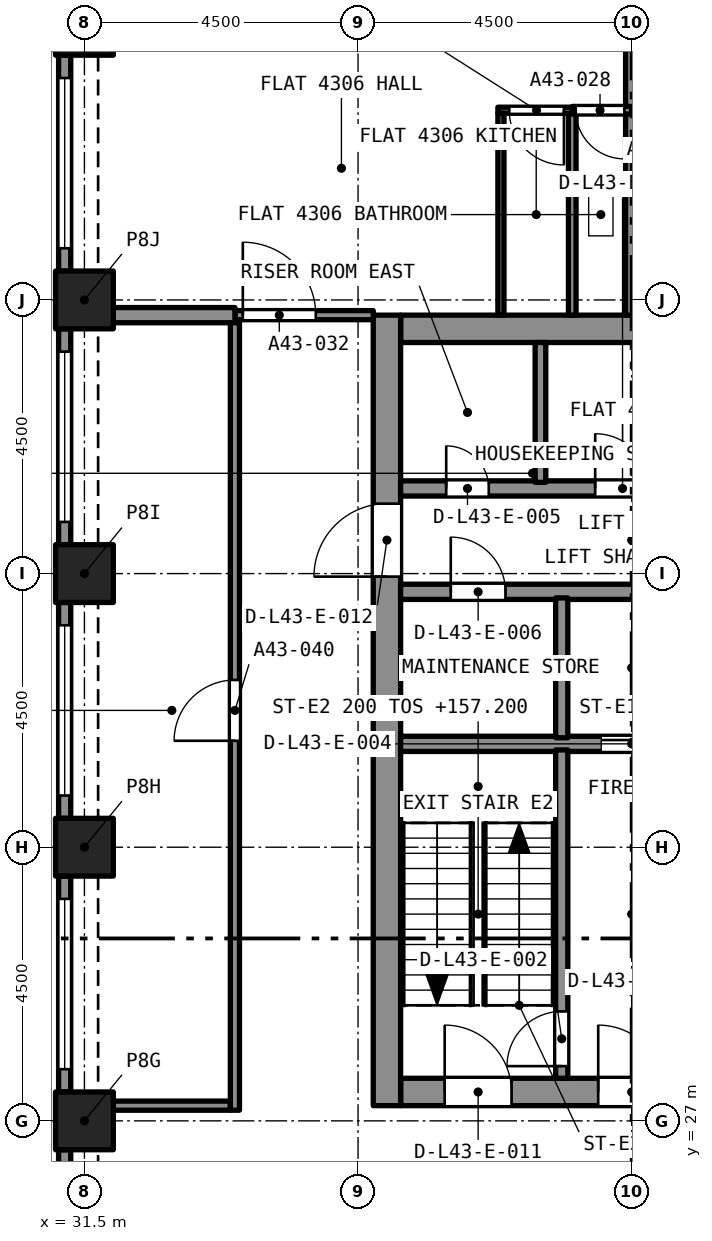
"""IFC4 building model, lengths in metres.
Left out: names, types, materials, properties, quantities, classifications, styles, units other than length and angle.
Written with IfcOpenShell. Run it as: python <this file> out.ifc"""

import sys

from ifc_helpers import new_model, si_unit, direction, frame, frame_2d, origin, origin_2d, place, context, subcontext, project, spatial, rectangle, extrude, element, fill, save


model = new_model("IFC4")
c1 = context("Model", 3, precision=1e-05, world=origin(), true_north=direction((0.0, 1.0)))
c2 = subcontext(c1, "Body", "Model", "MODEL_VIEW")
j1 = project(units=[si_unit("LENGTHUNIT", "METRE"), si_unit("PLANEANGLEUNIT", "RADIAN")], contexts=[c1])
p1 = place(None, origin())
s1 = spatial("IfcSite", under=j1, at=p1, CompositionType="ELEMENT")
p2 = place(p1, origin())
s2 = spatial("IfcBuilding", under=s1, at=p2, CompositionType="ELEMENT")
p3 = place(p2, frame((0.0, 0.0, 155.0)))
s3 = spatial("IfcBuildingStorey", under=s2, at=p3, CompositionType="ELEMENT", Elevation=155.0)
for number, where, z_axis, x_axis in (
    (1, (31.5, 27.0, 0.0), (0.0, 0.0, 1.0), (1.0, 0.0, 0.0)),
    (2, (31.5, 31.5, 0.0), (0.0, 0.0, 1.0), (1.0, 0.0, 0.0)),
    (3, (31.5, 36.0, 0.0), (0.0, 0.0, 1.0), (1.0, 0.0, 0.0)),
    (4, (31.5, 40.5, 0.0), (0.0, 0.0, 1.0), (1.0, 0.0, 0.0)),
    (5, (31.5, 45.0, 0.0), (0.0, 0.0, 1.0), (1.0, 0.0, 0.0)),
):
    element("IfcColumn", number, at=place(p3, frame(where, z_axis=z_axis, x_axis=x_axis)), inside=s3, PredefinedType="COLUMN", context=c2, shape_type="SweptSolid", body=[
        extrude(rectangle(XDim=0.95, YDim=0.95, at=origin_2d()), origin(), (0.0, 0.0, 1.0), 4.4),
    ])
p4 = place(p3, frame((36.7, 27.475, 0.0), z_axis=(0.0, 0.0, 1.0), x_axis=(1.0, 0.0, 0.0)))
e6 = element("IfcWall", 6, at=p4, inside=s3, PredefinedType="SOLIDWALL", context=c2, shape_type="SweptSolid", body=[
    extrude(rectangle(XDim=7.6, YDim=0.45, at=frame_2d((3.8, 0.0))), origin(), (0.0, 0.0, 1.0), 4.4),
])
p5 = place(p4, frame((5.775, 0.0, 0.0)))
e7 = element("IfcOpeningElement", 7, at=p5, cuts=e6, PredefinedType="OPENING", context=c2, shape_type="SweptSolid", body=[
    extrude(rectangle(XDim=1.1, YDim=2.1, at=frame_2d((0.55, 1.05))), frame((0.0, 0.235, 0.0), z_axis=(0.0, -1.0, 0.0), x_axis=(1.0, 0.0, 0.0)), (0.0, 0.0, 1.0), 0.47),
])
p6 = place(p4, frame((3.25, 0.0, 0.0)))
e8 = element("IfcOpeningElement", 8, at=p6, cuts=e6, PredefinedType="OPENING", context=c2, shape_type="SweptSolid", body=[
    extrude(rectangle(XDim=1.1, YDim=2.1, at=frame_2d((0.55, 1.05))), frame((0.0, 0.235, 0.0), z_axis=(0.0, -1.0, 0.0), x_axis=(1.0, 0.0, 0.0)), (0.0, 0.0, 1.0), 0.47),
])
p7 = place(p4, frame((0.725, 0.0, 0.0)))
e9 = element("IfcOpeningElement", 9, at=p7, cuts=e6, PredefinedType="OPENING", context=c2, shape_type="SweptSolid", body=[
    extrude(rectangle(XDim=1.1, YDim=2.1, at=frame_2d((0.55, 1.05))), frame((0.0, 0.235, 0.0), z_axis=(0.0, -1.0, 0.0), x_axis=(1.0, 0.0, 0.0)), (0.0, 0.0, 1.0), 0.47),
])
p8 = place(p3, frame((36.7, 40.025, 0.0), z_axis=(0.0, 0.0, 1.0), x_axis=(1.0, 0.0, 0.0)))
e10 = element("IfcWall", 10, at=p8, inside=s3, PredefinedType="SOLIDWALL", context=c2, shape_type="SweptSolid", body=[
    extrude(rectangle(XDim=7.6, YDim=0.45, at=frame_2d((3.8, 0.0))), origin(), (0.0, 0.0, 1.0), 4.4),
])
p9 = place(p3, frame((36.475, 27.25, 0.0), z_axis=(0.0, 0.0, 1.0), x_axis=(0.0, 1.0, 0.0)))
e11 = element("IfcWall", 11, at=p9, inside=s3, PredefinedType="SOLIDWALL", context=c2, shape_type="SweptSolid", body=[
    extrude(rectangle(XDim=13.0, YDim=0.45, at=frame_2d((6.5, 0.0))), origin(), (0.0, 0.0, 1.0), 4.4),
])
p10 = place(p9, frame((8.7, 0.0, 0.0)))
e12 = element("IfcOpeningElement", 12, at=p10, cuts=e11, PredefinedType="OPENING", context=c2, shape_type="SweptSolid", body=[
    extrude(rectangle(XDim=1.2, YDim=2.1, at=frame_2d((0.6, 1.05))), frame((0.0, 0.235, 0.0), z_axis=(0.0, -1.0, 0.0), x_axis=(1.0, 0.0, 0.0)), (0.0, 0.0, 1.0), 0.47),
])
p11 = place(p3, frame((31.175, 40.975, 0.0), z_axis=(0.0, 0.0, 1.0), x_axis=(0.0, 1.0, 0.0)))
e13 = element("IfcWall", 13, at=p11, inside=s3, PredefinedType="SOLIDWALL", context=c2, shape_type="SweptSolid", body=[
    extrude(rectangle(XDim=3.55, YDim=0.2, at=frame_2d((1.775, 0.0))), origin(), (0.0, 0.0, 1.0), 4.4),
])
p12 = place(p11, frame((0.375, 0.0, 0.45)))
e14 = element("IfcOpeningElement", 14, at=p12, cuts=e13, PredefinedType="OPENING", context=c2, shape_type="SweptSolid", body=[
    extrude(rectangle(XDim=2.8, YDim=2.55, at=frame_2d((1.4, 1.275))), frame((0.0, 0.11, 0.0), z_axis=(0.0, -1.0, 0.0), x_axis=(1.0, 0.0, 0.0)), (0.0, 0.0, 1.0), 0.22),
])
p13 = place(p3, frame((31.175, 36.475, 0.0), z_axis=(0.0, 0.0, 1.0), x_axis=(0.0, 1.0, 0.0)))
e15 = element("IfcWall", 15, at=p13, inside=s3, PredefinedType="SOLIDWALL", context=c2, shape_type="SweptSolid", body=[
    extrude(rectangle(XDim=3.55, YDim=0.2, at=frame_2d((1.775, 0.0))), origin(), (0.0, 0.0, 1.0), 4.4),
])
p14 = place(p13, frame((0.375, 0.0, 0.45)))
e16 = element("IfcOpeningElement", 16, at=p14, cuts=e15, PredefinedType="OPENING", context=c2, shape_type="SweptSolid", body=[
    extrude(rectangle(XDim=2.8, YDim=2.55, at=frame_2d((1.4, 1.275))), frame((0.0, 0.11, 0.0), z_axis=(0.0, -1.0, 0.0), x_axis=(1.0, 0.0, 0.0)), (0.0, 0.0, 1.0), 0.22),
])
p15 = place(p3, frame((31.175, 31.975, 0.0), z_axis=(0.0, 0.0, 1.0), x_axis=(0.0, 1.0, 0.0)))
e17 = element("IfcWall", 17, at=p15, inside=s3, PredefinedType="SOLIDWALL", context=c2, shape_type="SweptSolid", body=[
    extrude(rectangle(XDim=3.55, YDim=0.2, at=frame_2d((1.775, 0.0))), origin(), (0.0, 0.0, 1.0), 4.4),
])
p16 = place(p15, frame((0.375, 0.0, 0.45)))
e18 = element("IfcOpeningElement", 18, at=p16, cuts=e17, PredefinedType="OPENING", context=c2, shape_type="SweptSolid", body=[
    extrude(rectangle(XDim=2.8, YDim=2.55, at=frame_2d((1.4, 1.275))), frame((0.0, 0.11, 0.0), z_axis=(0.0, -1.0, 0.0), x_axis=(1.0, 0.0, 0.0)), (0.0, 0.0, 1.0), 0.22),
])
p17 = place(p3, frame((31.175, 27.475, 0.0), z_axis=(0.0, 0.0, 1.0), x_axis=(0.0, 1.0, 0.0)))
e19 = element("IfcWall", 19, at=p17, inside=s3, PredefinedType="SOLIDWALL", context=c2, shape_type="SweptSolid", body=[
    extrude(rectangle(XDim=3.55, YDim=0.2, at=frame_2d((1.775, 0.0))), origin(), (0.0, 0.0, 1.0), 4.4),
])
p18 = place(p17, frame((0.375, 0.0, 0.45)))
e20 = element("IfcOpeningElement", 20, at=p18, cuts=e19, PredefinedType="OPENING", context=c2, shape_type="SweptSolid", body=[
    extrude(rectangle(XDim=2.8, YDim=2.55, at=frame_2d((1.4, 1.275))), frame((0.0, 0.11, 0.0), z_axis=(0.0, -1.0, 0.0), x_axis=(1.0, 0.0, 0.0)), (0.0, 0.0, 1.0), 0.22),
])
p19 = place(p3, frame((31.175, 22.975, 0.0), z_axis=(0.0, 0.0, 1.0), x_axis=(0.0, 1.0, 0.0)))
e21 = element("IfcWall", 21, at=p19, inside=s3, PredefinedType="SOLIDWALL", context=c2, shape_type="SweptSolid", body=[
    extrude(rectangle(XDim=3.55, YDim=0.2, at=frame_2d((1.775, 0.0))), origin(), (0.0, 0.0, 1.0), 4.4),
])
p20 = place(p19, frame((0.375, 0.0, 0.45)))
e22 = element("IfcOpeningElement", 22, at=p20, cuts=e21, PredefinedType="OPENING", context=c2, shape_type="SweptSolid", body=[
    extrude(rectangle(XDim=2.8, YDim=2.55, at=frame_2d((1.4, 1.275))), frame((0.0, 0.11, 0.0), z_axis=(0.0, -1.0, 0.0), x_axis=(1.0, 0.0, 0.0)), (0.0, 0.0, 1.0), 0.22),
])
p21 = place(p3, frame((40.5, 43.61, 0.0), z_axis=(0.0, 0.0, 1.0), x_axis=(0.0, 1.0, 0.0)))
e23 = element("IfcWall", 23, at=p21, inside=s3, PredefinedType="PARTITIONING", context=c2, shape_type="SweptSolid", body=[
    extrude(rectangle(XDim=5.415, YDim=0.2, at=frame_2d((2.708, 0.0))), origin(), (0.0, 0.0, 1.0), 4.1),
])
p22 = place(p3, frame((40.5, 40.25, 0.0), z_axis=(0.0, 0.0, 1.0), x_axis=(0.0, 1.0, 0.0)))
e24 = element("IfcWall", 24, at=p22, inside=s3, PredefinedType="PARTITIONING", context=c2, shape_type="SweptSolid", body=[
    extrude(rectangle(XDim=3.37, YDim=0.2, at=frame_2d((1.685, 0.0))), origin(), (0.0, 0.0, 1.0), 4.1),
])
p23 = place(p3, frame((40.5, 43.62, 0.0), z_axis=(0.0, 0.0, 1.0), x_axis=(-1.0, 0.0, 0.0)))
e25 = element("IfcWall", 25, at=p23, inside=s3, PredefinedType="PARTITIONING", context=c2, shape_type="SweptSolid", body=[
    extrude(rectangle(XDim=0.977, YDim=0.125, at=frame_2d((0.489, 0.0))), origin(), (0.0, 0.0, 1.0), 4.1),
])
p24 = place(p23, frame((0.12, 0.0, 0.0)))
e26 = element("IfcOpeningElement", 26, at=p24, cuts=e25, PredefinedType="OPENING", context=c2, shape_type="SweptSolid", body=[
    extrude(rectangle(XDim=0.8, YDim=2.1, at=frame_2d((0.4, 1.05))), frame((0.0, 0.073, 0.0), z_axis=(0.0, -1.0, 0.0), x_axis=(1.0, 0.0, 0.0)), (0.0, 0.0, 1.0), 0.145),
])
p25 = place(p3, frame((39.523, 40.25, 0.0), z_axis=(0.0, 0.0, 1.0), x_axis=(0.0, 1.0, 0.0)))
e27 = element("IfcWall", 27, at=p25, inside=s3, PredefinedType="PARTITIONING", context=c2, shape_type="SweptSolid", body=[
    extrude(rectangle(XDim=3.308, YDim=0.125, at=frame_2d((1.654, 0.0))), origin(), (0.0, 0.0, 1.0), 4.1),
])
p26 = place(p3, frame((39.523, 43.62, 0.0), z_axis=(0.0, 0.0, 1.0), x_axis=(-1.0, 0.0, 0.0)))
e28 = element("IfcWall", 28, at=p26, inside=s3, PredefinedType="PARTITIONING", context=c2, shape_type="SweptSolid", body=[
    extrude(rectangle(XDim=1.223, YDim=0.1, at=frame_2d((0.611, 0.0))), origin(), (0.0, 0.0, 1.0), 4.1),
])
p27 = place(p26, frame((0.136, 0.0, 0.0)))
e29 = element("IfcOpeningElement", 29, at=p27, cuts=e28, PredefinedType="OPENING", context=c2, shape_type="SweptSolid", body=[
    extrude(rectangle(XDim=0.9, YDim=2.1, at=frame_2d((0.45, 1.05))), frame((0.0, 0.06, 0.0), z_axis=(0.0, -1.0, 0.0), x_axis=(1.0, 0.0, 0.0)), (0.0, 0.0, 1.0), 0.12),
])
p28 = place(p3, frame((38.35, 40.25, 0.0), z_axis=(0.0, 0.0, 1.0), x_axis=(0.0, 1.0, 0.0)))
e30 = element("IfcWall", 30, at=p28, inside=s3, PredefinedType="PARTITIONING", context=c2, shape_type="SweptSolid", body=[
    extrude(rectangle(XDim=3.32, YDim=0.1, at=frame_2d((1.66, 0.0))), origin(), (0.0, 0.0, 1.0), 4.1),
])
p29 = place(p3, frame((33.975, 40.25, 0.0), z_axis=(0.0, 0.0, 1.0), x_axis=(1.0, 0.0, 0.0)))
e31 = element("IfcWall", 31, at=p29, inside=s3, PredefinedType="PARTITIONING", context=c2, shape_type="SweptSolid", body=[
    extrude(rectangle(XDim=2.275, YDim=0.15, at=frame_2d((1.137, 0.0))), origin(), (0.0, 0.0, 1.0), 4.1),
])
p30 = place(p29, frame((0.13, 0.0, 0.0)))
e32 = element("IfcOpeningElement", 32, at=p30, cuts=e31, PredefinedType="OPENING", context=c2, shape_type="SweptSolid", body=[
    extrude(rectangle(XDim=1.2, YDim=2.4, at=frame_2d((0.6, 1.2))), frame((0.0, 0.085, 0.0), z_axis=(0.0, -1.0, 0.0), x_axis=(1.0, 0.0, 0.0)), (0.0, 0.0, 1.0), 0.17),
])
p31 = place(p3, frame((31.975, 40.25, 0.0), z_axis=(0.0, 0.0, 1.0), x_axis=(1.0, 0.0, 0.0)))
e33 = element("IfcWall", 33, at=p31, inside=s3, PredefinedType="PARTITIONING", context=c2, shape_type="SweptSolid", body=[
    extrude(rectangle(XDim=2.0, YDim=0.25, at=frame_2d((1.0, 0.0))), origin(), (0.0, 0.0, 1.0), 4.1),
])
p32 = place(p3, frame((31.975, 27.25, 0.0), z_axis=(0.0, 0.0, 1.0), x_axis=(1.0, 0.0, 0.0)))
e34 = element("IfcWall", 34, at=p32, inside=s3, PredefinedType="PARTITIONING", context=c2, shape_type="SweptSolid", body=[
    extrude(rectangle(XDim=1.925, YDim=0.15, at=frame_2d((0.962, 0.0))), origin(), (0.0, 0.0, 1.0), 4.1),
])
p33 = place(p3, frame((33.975, 27.175, 0.0), z_axis=(0.0, 0.0, 1.0), x_axis=(0.0, 1.0, 0.0)))
e35 = element("IfcWall", 35, at=p33, inside=s3, PredefinedType="PARTITIONING", context=c2, shape_type="SweptSolid", body=[
    extrude(rectangle(XDim=12.95, YDim=0.15, at=frame_2d((6.475, 0.0))), origin(), (0.0, 0.0, 1.0), 4.1),
])
p34 = place(p33, frame((6.075, 0.0, 0.0)))
e36 = element("IfcOpeningElement", 36, at=p34, cuts=e35, PredefinedType="OPENING", context=c2, shape_type="SweptSolid", body=[
    extrude(rectangle(XDim=1.0, YDim=2.1, at=frame_2d((0.5, 1.05))), frame((0.0, 0.085, 0.0), z_axis=(0.0, -1.0, 0.0), x_axis=(1.0, 0.0, 0.0)), (0.0, 0.0, 1.0), 0.17),
])
p35 = place(p3, frame((36.7, 33.2, 0.0), z_axis=(0.0, 0.0, 1.0), x_axis=(1.0, 0.0, 0.0)))
e37 = element("IfcWall", 37, at=p35, inside=s3, PredefinedType="SOLIDWALL", context=c2, shape_type="SweptSolid", body=[
    extrude(rectangle(XDim=7.6, YDim=0.25, at=frame_2d((3.8, 0.0))), origin(), (0.0, 0.0, 1.0), 4.1),
])
p36 = place(p35, frame((3.3, 0.0, 0.0)))
e38 = element("IfcOpeningElement", 38, at=p36, cuts=e37, PredefinedType="OPENING", context=c2, shape_type="SweptSolid", body=[
    extrude(rectangle(XDim=1.0, YDim=2.1, at=frame_2d((0.5, 1.05))), frame((0.0, 0.135, 0.0), z_axis=(0.0, -1.0, 0.0), x_axis=(1.0, 0.0, 0.0)), (0.0, 0.0, 1.0), 0.27),
])
p37 = place(p3, frame((36.7, 35.7, 0.0), z_axis=(0.0, 0.0, 1.0), x_axis=(1.0, 0.0, 0.0)))
e39 = element("IfcWall", 39, at=p37, inside=s3, PredefinedType="SOLIDWALL", context=c2, shape_type="SweptSolid", body=[
    extrude(rectangle(XDim=7.6, YDim=0.25, at=frame_2d((3.8, 0.0))), origin(), (0.0, 0.0, 1.0), 4.1),
])
p38 = place(p37, frame((5.775, 0.0, 0.0)))
e40 = element("IfcOpeningElement", 40, at=p38, cuts=e39, PredefinedType="OPENING", context=c2, shape_type="SweptSolid", body=[
    extrude(rectangle(XDim=1.1, YDim=2.4, at=frame_2d((0.55, 1.2))), frame((0.0, 0.135, 0.0), z_axis=(0.0, -1.0, 0.0), x_axis=(1.0, 0.0, 0.0)), (0.0, 0.0, 1.0), 0.27),
])
p39 = place(p37, frame((0.825, 0.0, 0.0)))
e41 = element("IfcOpeningElement", 41, at=p39, cuts=e39, PredefinedType="OPENING", context=c2, shape_type="SweptSolid", body=[
    extrude(rectangle(XDim=0.9, YDim=2.1, at=frame_2d((0.45, 1.05))), frame((0.0, 0.135, 0.0), z_axis=(0.0, -1.0, 0.0), x_axis=(1.0, 0.0, 0.0)), (0.0, 0.0, 1.0), 0.27),
])
p40 = place(p3, frame((36.7, 37.4, 0.0), z_axis=(0.0, 0.0, 1.0), x_axis=(1.0, 0.0, 0.0)))
e42 = element("IfcWall", 42, at=p40, inside=s3, PredefinedType="SOLIDWALL", context=c2, shape_type="SweptSolid", body=[
    extrude(rectangle(XDim=7.6, YDim=0.25, at=frame_2d((3.8, 0.0))), origin(), (0.0, 0.0, 1.0), 4.1),
])
p41 = place(p40, frame((0.75, 0.0, 0.0)))
e43 = element("IfcOpeningElement", 43, at=p41, cuts=e42, PredefinedType="OPENING", context=c2, shape_type="SweptSolid", body=[
    extrude(rectangle(XDim=0.7, YDim=2.1, at=frame_2d((0.35, 1.05))), frame((0.0, 0.135, 0.0), z_axis=(0.0, -1.0, 0.0), x_axis=(1.0, 0.0, 0.0)), (0.0, 0.0, 1.0), 0.27),
])
p42 = place(p40, frame((5.9, 0.0, 0.0)))
e44 = element("IfcOpeningElement", 44, at=p42, cuts=e42, PredefinedType="OPENING", context=c2, shape_type="SweptSolid", body=[
    extrude(rectangle(XDim=0.9, YDim=2.1, at=frame_2d((0.45, 1.05))), frame((0.0, 0.135, 0.0), z_axis=(0.0, -1.0, 0.0), x_axis=(1.0, 0.0, 0.0)), (0.0, 0.0, 1.0), 0.27),
])
p43 = place(p40, frame((3.2, 0.0, 0.0)))
e45 = element("IfcOpeningElement", 45, at=p43, cuts=e42, PredefinedType="OPENING", context=c2, shape_type="SweptSolid", body=[
    extrude(rectangle(XDim=0.9, YDim=2.1, at=frame_2d((0.45, 1.05))), frame((0.0, 0.135, 0.0), z_axis=(0.0, -1.0, 0.0), x_axis=(1.0, 0.0, 0.0)), (0.0, 0.0, 1.0), 0.27),
])
p44 = place(p3, frame((39.35, 27.7, 0.0), z_axis=(0.0, 0.0, 1.0), x_axis=(0.0, 1.0, 0.0)))
e46 = element("IfcWall", 46, at=p44, inside=s3, PredefinedType="SOLIDWALL", context=c2, shape_type="SweptSolid", body=[
    extrude(rectangle(XDim=5.4, YDim=0.2, at=frame_2d((2.7, 0.0))), origin(), (0.0, 0.0, 1.0), 4.1),
])
p45 = place(p44, frame((0.2, 0.0, 0.0)))
e47 = element("IfcOpeningElement", 47, at=p45, cuts=e46, PredefinedType="OPENING", context=c2, shape_type="SweptSolid", body=[
    extrude(rectangle(XDim=0.9, YDim=2.1, at=frame_2d((0.45, 1.05))), frame((0.0, 0.11, 0.0), z_axis=(0.0, -1.0, 0.0), x_axis=(1.0, 0.0, 0.0)), (0.0, 0.0, 1.0), 0.22),
])
p46 = place(p3, frame((39.35, 33.3, 0.0), z_axis=(0.0, 0.0, 1.0), x_axis=(0.0, 1.0, 0.0)))
e48 = element("IfcWall", 48, at=p46, inside=s3, PredefinedType="SOLIDWALL", context=c2, shape_type="SweptSolid", body=[
    extrude(rectangle(XDim=2.3, YDim=0.2, at=frame_2d((1.15, 0.0))), origin(), (0.0, 0.0, 1.0), 4.1),
])
p47 = place(p3, frame((39.0, 37.5, 0.0), z_axis=(0.0, 0.0, 1.0), x_axis=(0.0, 1.0, 0.0)))
e49 = element("IfcWall", 49, at=p47, inside=s3, PredefinedType="SOLIDWALL", context=c2, shape_type="SweptSolid", body=[
    extrude(rectangle(XDim=2.3, YDim=0.175, at=frame_2d((1.15, 0.0))), origin(), (0.0, 0.0, 1.0), 4.1),
])
p48 = place(p12, origin())
e50 = element("IfcWindow", 50, at=p48, inside=s3, PartitioningType="SINGLE_PANEL", PredefinedType="WINDOW", context=c2, shape_type="SweptSolid", body=[
    extrude(rectangle(XDim=2.8, YDim=2.55, at=frame_2d((1.4, 1.275))), frame((0.0, 0.03, 0.0), z_axis=(0.0, -1.0, 0.0), x_axis=(1.0, 0.0, 0.0)), (0.0, 0.0, 1.0), 0.06),
])
fill(e14, e50)
p49 = place(p14, origin())
e51 = element("IfcWindow", 51, at=p49, inside=s3, PartitioningType="SINGLE_PANEL", PredefinedType="WINDOW", context=c2, shape_type="SweptSolid", body=[
    extrude(rectangle(XDim=2.8, YDim=2.55, at=frame_2d((1.4, 1.275))), frame((0.0, 0.03, 0.0), z_axis=(0.0, -1.0, 0.0), x_axis=(1.0, 0.0, 0.0)), (0.0, 0.0, 1.0), 0.06),
])
fill(e16, e51)
p50 = place(p16, origin())
e52 = element("IfcWindow", 52, at=p50, inside=s3, PartitioningType="SINGLE_PANEL", PredefinedType="WINDOW", context=c2, shape_type="SweptSolid", body=[
    extrude(rectangle(XDim=2.8, YDim=2.55, at=frame_2d((1.4, 1.275))), frame((0.0, 0.03, 0.0), z_axis=(0.0, -1.0, 0.0), x_axis=(1.0, 0.0, 0.0)), (0.0, 0.0, 1.0), 0.06),
])
fill(e18, e52)
p51 = place(p18, origin())
e53 = element("IfcWindow", 53, at=p51, inside=s3, PartitioningType="SINGLE_PANEL", PredefinedType="WINDOW", context=c2, shape_type="SweptSolid", body=[
    extrude(rectangle(XDim=2.8, YDim=2.55, at=frame_2d((1.4, 1.275))), frame((0.0, 0.03, 0.0), z_axis=(0.0, -1.0, 0.0), x_axis=(1.0, 0.0, 0.0)), (0.0, 0.0, 1.0), 0.06),
])
fill(e20, e53)
p52 = place(p24, origin())
e54 = element("IfcDoor", 54, at=p52, inside=s3, OperationType="SINGLE_SWING_LEFT", PredefinedType="DOOR", context=c2, shape_type="SweptSolid", body=[
    extrude(rectangle(XDim=0.8, YDim=2.1, at=frame_2d((0.4, 1.05))), frame((0.0, 0.025, 0.0), z_axis=(0.0, -1.0, 0.0), x_axis=(1.0, 0.0, 0.0)), (0.0, 0.0, 1.0), 0.05),
])
fill(e26, e54)
p53 = place(p27, origin())
e55 = element("IfcDoor", 55, at=p53, inside=s3, OperationType="SINGLE_SWING_LEFT", PredefinedType="DOOR", context=c2, shape_type="SweptSolid", body=[
    extrude(rectangle(XDim=0.9, YDim=2.1, at=frame_2d((0.45, 1.05))), frame((0.0, 0.025, 0.0), z_axis=(0.0, -1.0, 0.0), x_axis=(1.0, 0.0, 0.0)), (0.0, 0.0, 1.0), 0.05),
])
fill(e29, e55)
p54 = place(p30, origin())
e56 = element("IfcDoor", 56, at=p54, inside=s3, OperationType="SINGLE_SWING_LEFT", PredefinedType="DOOR", context=c2, shape_type="SweptSolid", body=[
    extrude(rectangle(XDim=1.2, YDim=2.4, at=frame_2d((0.6, 1.2))), frame((0.0, 0.025, 0.0), z_axis=(0.0, -1.0, 0.0), x_axis=(1.0, 0.0, 0.0)), (0.0, 0.0, 1.0), 0.05),
])
fill(e32, e56)
p55 = place(p34, origin())
e57 = element("IfcDoor", 57, at=p55, inside=s3, OperationType="SINGLE_SWING_RIGHT", PredefinedType="DOOR", context=c2, shape_type="SweptSolid", body=[
    extrude(rectangle(XDim=1.0, YDim=2.1, at=frame_2d((0.5, 1.05))), frame((0.0, 0.025, 0.0), z_axis=(0.0, -1.0, 0.0), x_axis=(1.0, 0.0, 0.0)), (0.0, 0.0, 1.0), 0.05),
])
fill(e36, e57)
p56 = place(p45, origin())
e58 = element("IfcDoor", 58, at=p56, inside=s3, OperationType="SINGLE_SWING_LEFT", PredefinedType="DOOR", context=c2, shape_type="SweptSolid", body=[
    extrude(rectangle(XDim=0.9, YDim=2.1, at=frame_2d((0.45, 1.05))), frame((0.0, 0.025, 0.0), z_axis=(0.0, -1.0, 0.0), x_axis=(1.0, 0.0, 0.0)), (0.0, 0.0, 1.0), 0.05),
])
fill(e47, e58)
p57 = place(p36, origin())
e59 = element("IfcDoor", 59, at=p57, inside=s3, OperationType="SLIDING_TO_LEFT", PredefinedType="DOOR", context=c2, shape_type="SweptSolid", body=[
    extrude(rectangle(XDim=1.0, YDim=2.1, at=frame_2d((0.5, 1.05))), frame((0.0, 0.025, 0.0), z_axis=(0.0, -1.0, 0.0), x_axis=(1.0, 0.0, 0.0)), (0.0, 0.0, 1.0), 0.05),
])
fill(e38, e59)
p58 = place(p41, origin())
e60 = element("IfcDoor", 60, at=p58, inside=s3, OperationType="SINGLE_SWING_LEFT", PredefinedType="DOOR", context=c2, shape_type="SweptSolid", body=[
    extrude(rectangle(XDim=0.7, YDim=2.1, at=frame_2d((0.35, 1.05))), frame((0.0, 0.025, 0.0), z_axis=(0.0, -1.0, 0.0), x_axis=(1.0, 0.0, 0.0)), (0.0, 0.0, 1.0), 0.05),
])
fill(e43, e60)
p59 = place(p39, origin())
e61 = element("IfcDoor", 61, at=p59, inside=s3, OperationType="SINGLE_SWING_LEFT", PredefinedType="DOOR", context=c2, shape_type="SweptSolid", body=[
    extrude(rectangle(XDim=0.9, YDim=2.1, at=frame_2d((0.45, 1.05))), frame((0.0, 0.025, 0.0), z_axis=(0.0, -1.0, 0.0), x_axis=(1.0, 0.0, 0.0)), (0.0, 0.0, 1.0), 0.05),
])
fill(e41, e61)
p60 = place(p43, origin())
e62 = element("IfcDoor", 62, at=p60, inside=s3, OperationType="SINGLE_SWING_LEFT", PredefinedType="DOOR", context=c2, shape_type="SweptSolid", body=[
    extrude(rectangle(XDim=0.9, YDim=2.1, at=frame_2d((0.45, 1.05))), frame((0.0, 0.025, 0.0), z_axis=(0.0, -1.0, 0.0), x_axis=(1.0, 0.0, 0.0)), (0.0, 0.0, 1.0), 0.05),
])
fill(e45, e62)
p61 = place(p6, origin())
e63 = element("IfcDoor", 63, at=p61, inside=s3, OperationType="SINGLE_SWING_LEFT", PredefinedType="DOOR", context=c2, shape_type="SweptSolid", body=[
    extrude(rectangle(XDim=1.1, YDim=2.1, at=frame_2d((0.55, 1.05))), frame((0.0, 0.025, 0.0), z_axis=(0.0, -1.0, 0.0), x_axis=(1.0, 0.0, 0.0)), (0.0, 0.0, 1.0), 0.05),
])
fill(e8, e63)
p62 = place(p7, origin())
e64 = element("IfcDoor", 64, at=p62, inside=s3, OperationType="SINGLE_SWING_LEFT", PredefinedType="DOOR", context=c2, shape_type="SweptSolid", body=[
    extrude(rectangle(XDim=1.1, YDim=2.1, at=frame_2d((0.55, 1.05))), frame((0.0, 0.025, 0.0), z_axis=(0.0, -1.0, 0.0), x_axis=(1.0, 0.0, 0.0)), (0.0, 0.0, 1.0), 0.05),
])
fill(e9, e64)
p63 = place(p10, origin())
e65 = element("IfcDoor", 65, at=p63, inside=s3, OperationType="SINGLE_SWING_LEFT", PredefinedType="DOOR", context=c2, shape_type="SweptSolid", body=[
    extrude(rectangle(XDim=1.2, YDim=2.1, at=frame_2d((0.6, 1.05))), frame((0.0, 0.025, 0.0), z_axis=(0.0, -1.0, 0.0), x_axis=(1.0, 0.0, 0.0)), (0.0, 0.0, 1.0), 0.05),
])
fill(e12, e65)
save(model, sys.argv[1])
